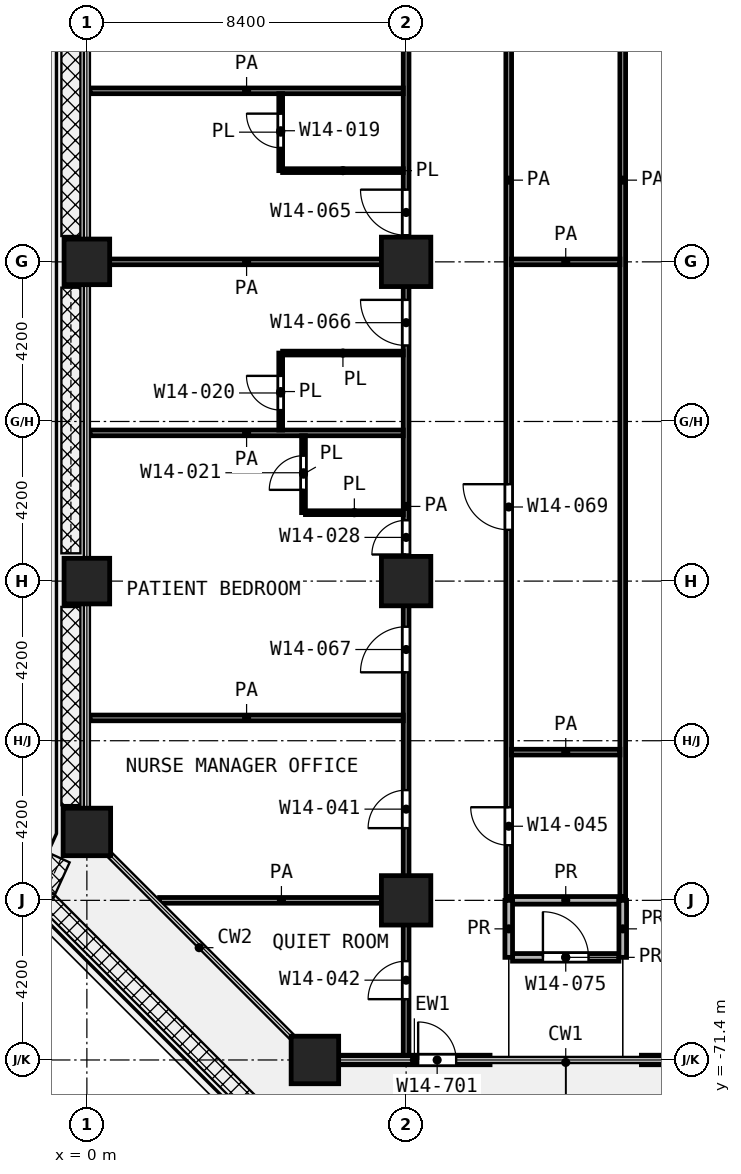
"""IFC4 building model, lengths in metres.
Left out: names, types, materials, properties, quantities, classifications, styles, units other than length and angle.
Written with IfcOpenShell. Run it as: python <this file> out.ifc"""

import sys

from ifc_helpers import new_model, si_unit, direction, frame, frame_2d, origin, origin_2d, place, context, subcontext, project, spatial, rectangle, extrude, element, fill, save


model = new_model("IFC4")
c1 = context("Model", 3, precision=1e-05, world=origin(), true_north=direction((0.0, 1.0)))
c2 = subcontext(c1, "Body", "Model", "MODEL_VIEW")
j1 = project(units=[si_unit("LENGTHUNIT", "METRE"), si_unit("PLANEANGLEUNIT", "RADIAN")], contexts=[c1])
p1 = place(None, origin())
s1 = spatial("IfcSite", under=j1, at=p1, CompositionType="ELEMENT")
p2 = place(p1, origin())
s2 = spatial("IfcBuilding", under=s1, at=p2, CompositionType="ELEMENT")
p3 = place(p2, frame((0.0, 0.0, 64.4)))
s3 = spatial("IfcBuildingStorey", under=s2, at=p3, CompositionType="ELEMENT", Elevation=64.4)
p4 = place(p3, frame((0.0, -50.4, 0.0), z_axis=(0.0, 0.0, 1.0), x_axis=(1.0, 0.0, 0.0)))
e1 = element("IfcColumn", 1, at=p4, inside=s3, PredefinedType="COLUMN", context=c2, shape_type="SweptSolid", body=[
    extrude(rectangle(XDim=1.2, YDim=1.2, at=origin_2d()), origin(), (0.0, 0.0, 1.0), 4.2),
])
p5 = place(p3, frame((8.4, -50.4, 0.0), z_axis=(0.0, 0.0, 1.0), x_axis=(1.0, 0.0, 0.0)))
e2 = element("IfcColumn", 2, at=p5, inside=s3, PredefinedType="COLUMN", context=c2, shape_type="SweptSolid", body=[
    extrude(rectangle(XDim=1.3, YDim=1.3, at=origin_2d()), origin(), (0.0, 0.0, 1.0), 4.2),
])
p6 = place(p3, frame((0.0, -58.8, 0.0), z_axis=(0.0, 0.0, 1.0), x_axis=(1.0, 0.0, 0.0)))
e3 = element("IfcColumn", 3, at=p6, inside=s3, PredefinedType="COLUMN", context=c2, shape_type="SweptSolid", body=[
    extrude(rectangle(XDim=1.2, YDim=1.2, at=origin_2d()), origin(), (0.0, 0.0, 1.0), 4.2),
])
p7 = place(p3, frame((8.4, -58.8, 0.0), z_axis=(0.0, 0.0, 1.0), x_axis=(1.0, 0.0, 0.0)))
e4 = element("IfcColumn", 4, at=p7, inside=s3, PredefinedType="COLUMN", context=c2, shape_type="SweptSolid", body=[
    extrude(rectangle(XDim=1.3, YDim=1.3, at=origin_2d()), origin(), (0.0, 0.0, 1.0), 4.2),
])
p8 = place(p3, frame((0.0, -65.4, 0.0), z_axis=(0.0, 0.0, 1.0), x_axis=(1.0, 0.0, 0.0)))
e5 = element("IfcColumn", 5, at=p8, inside=s3, PredefinedType="COLUMN", context=c2, shape_type="SweptSolid", body=[
    extrude(rectangle(XDim=1.25, YDim=1.25, at=origin_2d()), origin(), (0.0, 0.0, 1.0), 4.2),
])
p9 = place(p3, frame((8.4, -67.2, 0.0), z_axis=(0.0, 0.0, 1.0), x_axis=(1.0, 0.0, 0.0)))
e6 = element("IfcColumn", 6, at=p9, inside=s3, PredefinedType="COLUMN", context=c2, shape_type="SweptSolid", body=[
    extrude(rectangle(XDim=1.3, YDim=1.3, at=origin_2d()), origin(), (0.0, 0.0, 1.0), 4.2),
])
p10 = place(p3, frame((6.0, -71.4, 0.0), z_axis=(0.0, 0.0, 1.0), x_axis=(1.0, 0.0, 0.0)))
e7 = element("IfcColumn", 7, at=p10, inside=s3, PredefinedType="COLUMN", context=c2, shape_type="SweptSolid", body=[
    extrude(rectangle(XDim=1.25, YDim=1.25, at=origin_2d()), origin(), (0.0, 0.0, 1.0), 4.2),
])
p11 = place(p3, frame((6.625, -71.4, 0.0), z_axis=(0.0, 0.0, 1.0), x_axis=(1.0, 0.0, 0.0)))
e8 = element("IfcWall", 8, at=p11, inside=s3, PredefinedType="SOLIDWALL", context=c2, shape_type="SweptSolid", body=[
    extrude(rectangle(XDim=3.983, YDim=0.25, at=frame_2d((1.992, 0.0))), origin(), (0.0, 0.0, 1.0), 3.78),
])
p12 = place(p11, frame((2.092, 0.0, 0.0)))
e9 = element("IfcOpeningElement", 9, at=p12, cuts=e8, PredefinedType="OPENING", context=c2, shape_type="SweptSolid", body=[
    extrude(rectangle(XDim=1.0, YDim=2.1, at=frame_2d((0.5, 1.05))), frame((0.0, 0.135, 0.0), z_axis=(0.0, -1.0, 0.0), x_axis=(1.0, 0.0, 0.0)), (0.0, 0.0, 1.0), 0.27),
])
p13 = place(p3, frame((14.592, -71.4, 0.0), z_axis=(0.0, 0.0, 1.0), x_axis=(1.0, 0.0, 0.0)))
e10 = element("IfcWall", 10, at=p13, inside=s3, PredefinedType="SOLIDWALL", context=c2, shape_type="SweptSolid", body=[
    extrude(rectangle(XDim=3.983, YDim=0.25, at=frame_2d((1.992, 0.0))), origin(), (0.0, 0.0, 1.0), 3.78),
])
p14 = place(p13, frame((0.892, 0.0, 0.0)))
e11 = element("IfcOpeningElement", 11, at=p14, cuts=e10, PredefinedType="OPENING", context=c2, shape_type="SweptSolid", body=[
    extrude(rectangle(XDim=1.0, YDim=2.1, at=frame_2d((0.5, 1.05))), frame((0.0, 0.135, 0.0), z_axis=(0.0, -1.0, 0.0), x_axis=(1.0, 0.0, 0.0)), (0.0, 0.0, 1.0), 0.27),
])
p15 = place(p3, frame((5.751, -57.0, 0.0), z_axis=(0.0, 0.0, 1.0), x_axis=(1.0, 0.0, 0.0)))
e12 = element("IfcWall", 12, at=p15, inside=s3, PredefinedType="PARTITIONING", context=c2, shape_type="SweptSolid", body=[
    extrude(rectangle(XDim=2.574, YDim=0.1, at=frame_2d((1.287, 0.0))), origin(), (0.0, 0.0, 1.0), 3.9),
])
for number, where, z_axis, x_axis in (
    (13, (5.15, -52.8, 0.0), (0.0, 0.0, 1.0), (1.0, 0.0, 0.0)),
    (14, (5.15, -48.0, 0.0), (0.0, 0.0, 1.0), (1.0, 0.0, 0.0)),
):
    element("IfcWall", number, at=place(p3, frame(where, z_axis=z_axis, x_axis=x_axis)), inside=s3, PredefinedType="PARTITIONING", context=c2, shape_type="SweptSolid", body=[
        extrude(rectangle(XDim=3.175, YDim=0.1, at=frame_2d((1.587, 0.0))), origin(), (0.0, 0.0, 1.0), 3.9),
    ])
p16 = place(p3, frame((5.1, -54.825, 0.0), z_axis=(0.0, 0.0, 1.0), x_axis=(0.0, 1.0, 0.0)))
e15 = element("IfcWall", 15, at=p16, inside=s3, PredefinedType="PARTITIONING", context=c2, shape_type="SweptSolid", body=[
    extrude(rectangle(XDim=2.025, YDim=0.1, at=frame_2d((1.012, 0.0))), origin(), (0.0, 0.0, 1.0), 3.9),
])
p17 = place(p16, frame((0.525, 0.0, 0.0)))
e16 = element("IfcOpeningElement", 16, at=p17, cuts=e15, PredefinedType="OPENING", context=c2, shape_type="SweptSolid", body=[
    extrude(rectangle(XDim=0.9, YDim=2.1, at=frame_2d((0.45, 1.05))), frame((0.0, 0.06, 0.0), z_axis=(0.0, -1.0, 0.0), x_axis=(1.0, 0.0, 0.0)), (0.0, 0.0, 1.0), 0.12),
])
p18 = place(p3, frame((5.1, -48.0, 0.0), z_axis=(0.0, 0.0, 1.0), x_axis=(0.0, 1.0, 0.0)))
e17 = element("IfcWall", 17, at=p18, inside=s3, PredefinedType="PARTITIONING", context=c2, shape_type="SweptSolid", body=[
    extrude(rectangle(XDim=2.025, YDim=0.1, at=frame_2d((1.012, 0.0))), origin(), (0.0, 0.0, 1.0), 3.9),
])
p19 = place(p18, frame((0.6, 0.0, 0.0)))
e18 = element("IfcOpeningElement", 18, at=p19, cuts=e17, PredefinedType="OPENING", context=c2, shape_type="SweptSolid", body=[
    extrude(rectangle(XDim=0.9, YDim=2.1, at=frame_2d((0.45, 1.05))), frame((0.0, 0.06, 0.0), z_axis=(0.0, -1.0, 0.0), x_axis=(1.0, 0.0, 0.0)), (0.0, 0.0, 1.0), 0.12),
])
p20 = place(p3, frame((5.7, -56.998, 0.0), z_axis=(0.0, 0.0, 1.0), x_axis=(0.0, 1.0, 0.0)))
e19 = element("IfcWall", 19, at=p20, inside=s3, PredefinedType="PARTITIONING", context=c2, shape_type="SweptSolid", body=[
    extrude(rectangle(XDim=2.023, YDim=0.1, at=frame_2d((1.011, 0.0))), origin(), (0.0, 0.0, 1.0), 3.9),
])
p21 = place(p20, frame((0.599, 0.0, 0.0)))
e20 = element("IfcOpeningElement", 20, at=p21, cuts=e19, PredefinedType="OPENING", context=c2, shape_type="SweptSolid", body=[
    extrude(rectangle(XDim=0.9, YDim=2.1, at=frame_2d((0.45, 1.05))), frame((0.0, 0.06, 0.0), z_axis=(0.0, -1.0, 0.0), x_axis=(1.0, 0.0, 0.0)), (0.0, 0.0, 1.0), 0.12),
])
p22 = place(p3, frame((1.913, -67.2, 0.0), z_axis=(0.0, 0.0, 1.0), x_axis=(1.0, 0.0, 0.0)))
e21 = element("IfcWall", 21, at=p22, inside=s3, PredefinedType="PARTITIONING", context=c2, shape_type="SweptSolid", body=[
    extrude(rectangle(XDim=6.412, YDim=0.15, at=frame_2d((3.206, 0.0))), origin(), (0.0, 0.0, 1.0), 3.9),
])
p23 = place(p3, frame((11.175, -63.3, 0.0), z_axis=(0.0, 0.0, 1.0), x_axis=(1.0, 0.0, 0.0)))
e22 = element("IfcWall", 22, at=p23, inside=s3, PredefinedType="PARTITIONING", context=c2, shape_type="SweptSolid", body=[
    extrude(rectangle(XDim=2.85, YDim=0.15, at=frame_2d((1.425, 0.0))), origin(), (0.0, 0.0, 1.0), 3.9),
])
for number, where, z_axis, x_axis in (
    (23, (0.08, -62.4, 0.0), (0.0, 0.0, 1.0), (1.0, 0.0, 0.0)),
    (24, (0.08, -54.9, 0.0), (0.0, 0.0, 1.0), (1.0, 0.0, 0.0)),
    (25, (0.08, -50.4, 0.0), (0.0, 0.0, 1.0), (1.0, 0.0, 0.0)),
):
    element("IfcWall", number, at=place(p3, frame(where, z_axis=z_axis, x_axis=x_axis)), inside=s3, PredefinedType="PARTITIONING", context=c2, shape_type="SweptSolid", body=[
        extrude(rectangle(XDim=8.245, YDim=0.15, at=frame_2d((4.123, 0.0))), origin(), (0.0, 0.0, 1.0), 3.9),
    ])
p24 = place(p3, frame((11.175, -50.4, 0.0), z_axis=(0.0, 0.0, 1.0), x_axis=(1.0, 0.0, 0.0)))
e26 = element("IfcWall", 26, at=p24, inside=s3, PredefinedType="PARTITIONING", context=c2, shape_type="SweptSolid", body=[
    extrude(rectangle(XDim=2.85, YDim=0.15, at=frame_2d((1.425, 0.0))), origin(), (0.0, 0.0, 1.0), 3.9),
])
p25 = place(p3, frame((0.08, -45.9, 0.0), z_axis=(0.0, 0.0, 1.0), x_axis=(1.0, 0.0, 0.0)))
e27 = element("IfcWall", 27, at=p25, inside=s3, PredefinedType="PARTITIONING", context=c2, shape_type="SweptSolid", body=[
    extrude(rectangle(XDim=8.245, YDim=0.15, at=frame_2d((4.123, 0.0))), origin(), (0.0, 0.0, 1.0), 3.9),
])
p26 = place(p3, frame((8.4, -71.32, 0.0), z_axis=(0.0, 0.0, 1.0), x_axis=(0.0, 1.0, 0.0)))
e28 = element("IfcWall", 28, at=p26, inside=s3, PredefinedType="PARTITIONING", context=c2, shape_type="SweptSolid", body=[
    extrude(rectangle(XDim=28.97, YDim=0.15, at=frame_2d((14.485, 0.0))), origin(), (0.0, 0.0, 1.0), 3.9),
])
p27 = place(p26, frame((21.62, 0.0, 0.0)))
e29 = element("IfcOpeningElement", 29, at=p27, cuts=e28, PredefinedType="OPENING", context=c2, shape_type="SweptSolid", body=[
    extrude(rectangle(XDim=1.2, YDim=2.1, at=frame_2d((0.6, 1.05))), frame((0.0, 0.085, 0.0), z_axis=(0.0, -1.0, 0.0), x_axis=(1.0, 0.0, 0.0)), (0.0, 0.0, 1.0), 0.17),
])
p28 = place(p26, frame((18.72, 0.0, 0.0)))
e30 = element("IfcOpeningElement", 30, at=p28, cuts=e28, PredefinedType="OPENING", context=c2, shape_type="SweptSolid", body=[
    extrude(rectangle(XDim=1.2, YDim=2.1, at=frame_2d((0.6, 1.05))), frame((0.0, 0.085, 0.0), z_axis=(0.0, -1.0, 0.0), x_axis=(1.0, 0.0, 0.0)), (0.0, 0.0, 1.0), 0.17),
])
p29 = place(p26, frame((10.12, 0.0, 0.0)))
e31 = element("IfcOpeningElement", 31, at=p29, cuts=e28, PredefinedType="OPENING", context=c2, shape_type="SweptSolid", body=[
    extrude(rectangle(XDim=1.2, YDim=2.1, at=frame_2d((0.6, 1.05))), frame((0.0, 0.085, 0.0), z_axis=(0.0, -1.0, 0.0), x_axis=(1.0, 0.0, 0.0)), (0.0, 0.0, 1.0), 0.17),
])
p30 = place(p26, frame((13.22, 0.0, 0.0)))
e32 = element("IfcOpeningElement", 32, at=p30, cuts=e28, PredefinedType="OPENING", context=c2, shape_type="SweptSolid", body=[
    extrude(rectangle(XDim=0.9, YDim=2.1, at=frame_2d((0.45, 1.05))), frame((0.0, 0.085, 0.0), z_axis=(0.0, -1.0, 0.0), x_axis=(1.0, 0.0, 0.0)), (0.0, 0.0, 1.0), 0.17),
])
p31 = place(p26, frame((6.02, 0.0, 0.0)))
e33 = element("IfcOpeningElement", 33, at=p31, cuts=e28, PredefinedType="OPENING", context=c2, shape_type="SweptSolid", body=[
    extrude(rectangle(XDim=1.0, YDim=2.1, at=frame_2d((0.5, 1.05))), frame((0.0, 0.085, 0.0), z_axis=(0.0, -1.0, 0.0), x_axis=(1.0, 0.0, 0.0)), (0.0, 0.0, 1.0), 0.17),
])
p32 = place(p26, frame((1.52, 0.0, 0.0)))
e34 = element("IfcOpeningElement", 34, at=p32, cuts=e28, PredefinedType="OPENING", context=c2, shape_type="SweptSolid", body=[
    extrude(rectangle(XDim=1.0, YDim=2.1, at=frame_2d((0.5, 1.05))), frame((0.0, 0.085, 0.0), z_axis=(0.0, -1.0, 0.0), x_axis=(1.0, 0.0, 0.0)), (0.0, 0.0, 1.0), 0.17),
])
p33 = place(p3, frame((11.1, -67.1, 0.0), z_axis=(0.0, 0.0, 1.0), x_axis=(0.0, 1.0, 0.0)))
e35 = element("IfcWall", 35, at=p33, inside=s3, PredefinedType="PARTITIONING", context=c2, shape_type="SweptSolid", body=[
    extrude(rectangle(XDim=37.7, YDim=0.15, at=frame_2d((18.85, 0.0))), origin(), (0.0, 0.0, 1.0), 3.9),
])
p34 = place(p33, frame((35.1, 0.0, 0.0)))
e36 = element("IfcOpeningElement", 36, at=p34, cuts=e35, PredefinedType="OPENING", context=c2, shape_type="SweptSolid", body=[
    extrude(rectangle(XDim=1.0, YDim=2.1, at=frame_2d((0.5, 1.05))), frame((0.0, 0.085, 0.0), z_axis=(0.0, -1.0, 0.0), x_axis=(1.0, 0.0, 0.0)), (0.0, 0.0, 1.0), 0.17),
])
p35 = place(p33, frame((22.4, 0.0, 0.0)))
e37 = element("IfcOpeningElement", 37, at=p35, cuts=e35, PredefinedType="OPENING", context=c2, shape_type="SweptSolid", body=[
    extrude(rectangle(XDim=1.2, YDim=2.1, at=frame_2d((0.6, 1.05))), frame((0.0, 0.085, 0.0), z_axis=(0.0, -1.0, 0.0), x_axis=(1.0, 0.0, 0.0)), (0.0, 0.0, 1.0), 0.17),
])
p36 = place(p33, frame((9.65, 0.0, 0.0)))
e38 = element("IfcOpeningElement", 38, at=p36, cuts=e35, PredefinedType="OPENING", context=c2, shape_type="SweptSolid", body=[
    extrude(rectangle(XDim=1.2, YDim=2.1, at=frame_2d((0.6, 1.05))), frame((0.0, 0.085, 0.0), z_axis=(0.0, -1.0, 0.0), x_axis=(1.0, 0.0, 0.0)), (0.0, 0.0, 1.0), 0.17),
])
p37 = place(p33, frame((1.35, 0.0, 0.0)))
e39 = element("IfcOpeningElement", 39, at=p37, cuts=e35, PredefinedType="OPENING", context=c2, shape_type="SweptSolid", body=[
    extrude(rectangle(XDim=1.0, YDim=2.1, at=frame_2d((0.5, 1.05))), frame((0.0, 0.085, 0.0), z_axis=(0.0, -1.0, 0.0), x_axis=(1.0, 0.0, 0.0)), (0.0, 0.0, 1.0), 0.17),
])
p38 = place(p3, frame((14.1, -67.1, 0.0), z_axis=(0.0, 0.0, 1.0), x_axis=(0.0, 1.0, 0.0)))
e40 = element("IfcWall", 40, at=p38, inside=s3, PredefinedType="PARTITIONING", context=c2, shape_type="SweptSolid", body=[
    extrude(rectangle(XDim=37.7, YDim=0.15, at=frame_2d((18.85, 0.0))), origin(), (0.0, 0.0, 1.0), 3.9),
])
p39 = place(p38, frame((30.9, 0.0, 0.0)))
e41 = element("IfcOpeningElement", 41, at=p39, cuts=e40, PredefinedType="OPENING", context=c2, shape_type="SweptSolid", body=[
    extrude(rectangle(XDim=1.0, YDim=2.1, at=frame_2d((0.5, 1.05))), frame((0.0, 0.085, 0.0), z_axis=(0.0, -1.0, 0.0), x_axis=(1.0, 0.0, 0.0)), (0.0, 0.0, 1.0), 0.17),
])
p40 = place(p3, frame((11.2, -68.7, 0.0), z_axis=(0.0, 0.0, 1.0), x_axis=(1.0, 0.0, 0.0)))
e42 = element("IfcWall", 42, at=p40, inside=s3, PredefinedType="PARTITIONING", context=c2, shape_type="SweptSolid", body=[
    extrude(rectangle(XDim=2.8, YDim=0.2, at=frame_2d((1.4, 0.0))), origin(), (0.0, 0.0, 1.0), 3.9),
])
p41 = place(p40, frame((0.8, 0.0, 0.0)))
e43 = element("IfcOpeningElement", 43, at=p41, cuts=e42, PredefinedType="OPENING", context=c2, shape_type="SweptSolid", body=[
    extrude(rectangle(XDim=1.2, YDim=2.1, at=frame_2d((0.6, 1.05))), frame((0.0, 0.11, 0.0), z_axis=(0.0, -1.0, 0.0), x_axis=(1.0, 0.0, 0.0)), (0.0, 0.0, 1.0), 0.22),
])
p42 = place(p3, frame((11.2, -67.2, 0.0), z_axis=(0.0, 0.0, 1.0), x_axis=(1.0, 0.0, 0.0)))
e44 = element("IfcWall", 44, at=p42, inside=s3, PredefinedType="PARTITIONING", context=c2, shape_type="SweptSolid", body=[
    extrude(rectangle(XDim=2.8, YDim=0.2, at=frame_2d((1.4, 0.0))), origin(), (0.0, 0.0, 1.0), 3.9),
])
for number, where, z_axis, x_axis in (
    (45, (11.1, -68.7, 0.0), (0.0, 0.0, 1.0), (0.0, 1.0, 0.0)),
    (46, (14.1, -68.7, 0.0), (0.0, 0.0, 1.0), (0.0, 1.0, 0.0)),
):
    element("IfcWall", number, at=place(p3, frame(where, z_axis=z_axis, x_axis=x_axis)), inside=s3, PredefinedType="PARTITIONING", context=c2, shape_type="SweptSolid", body=[
        extrude(rectangle(XDim=1.5, YDim=0.2, at=frame_2d((0.75, 0.0))), origin(), (0.0, 0.0, 1.0), 3.9),
    ])
p43 = place(p12, origin())
e47 = element("IfcDoor", 47, at=p43, inside=s3, OperationType="SINGLE_SWING_LEFT", PredefinedType="DOOR", context=c2, shape_type="SweptSolid", body=[
    extrude(rectangle(XDim=1.0, YDim=2.1, at=frame_2d((0.5, 1.05))), frame((0.0, 0.025, 0.0), z_axis=(0.0, -1.0, 0.0), x_axis=(1.0, 0.0, 0.0)), (0.0, 0.0, 1.0), 0.05),
])
fill(e9, e47)
p44 = place(p27, origin())
e48 = element("IfcDoor", 48, at=p44, inside=s3, OperationType="SINGLE_SWING_RIGHT", PredefinedType="DOOR", context=c2, shape_type="SweptSolid", body=[
    extrude(rectangle(XDim=1.2, YDim=2.1, at=frame_2d((0.6, 1.05))), frame((0.0, 0.025, 0.0), z_axis=(0.0, -1.0, 0.0), x_axis=(1.0, 0.0, 0.0)), (0.0, 0.0, 1.0), 0.05),
])
fill(e29, e48)
p45 = place(p19, origin())
e49 = element("IfcDoor", 49, at=p45, inside=s3, OperationType="SINGLE_SWING_RIGHT", PredefinedType="DOOR", context=c2, shape_type="SweptSolid", body=[
    extrude(rectangle(XDim=0.9, YDim=2.1, at=frame_2d((0.45, 1.05))), frame((0.0, 0.025, 0.0), z_axis=(0.0, -1.0, 0.0), x_axis=(1.0, 0.0, 0.0)), (0.0, 0.0, 1.0), 0.05),
])
fill(e18, e49)
p46 = place(p28, origin())
e50 = element("IfcDoor", 50, at=p46, inside=s3, OperationType="SINGLE_SWING_RIGHT", PredefinedType="DOOR", context=c2, shape_type="SweptSolid", body=[
    extrude(rectangle(XDim=1.2, YDim=2.1, at=frame_2d((0.6, 1.05))), frame((0.0, 0.025, 0.0), z_axis=(0.0, -1.0, 0.0), x_axis=(1.0, 0.0, 0.0)), (0.0, 0.0, 1.0), 0.05),
])
fill(e30, e50)
p47 = place(p17, origin())
e51 = element("IfcDoor", 51, at=p47, inside=s3, OperationType="SINGLE_SWING_RIGHT", PredefinedType="DOOR", context=c2, shape_type="SweptSolid", body=[
    extrude(rectangle(XDim=0.9, YDim=2.1, at=frame_2d((0.45, 1.05))), frame((0.0, 0.025, 0.0), z_axis=(0.0, -1.0, 0.0), x_axis=(1.0, 0.0, 0.0)), (0.0, 0.0, 1.0), 0.05),
])
fill(e16, e51)
p48 = place(p29, origin())
e52 = element("IfcDoor", 52, at=p48, inside=s3, OperationType="SINGLE_SWING_LEFT", PredefinedType="DOOR", context=c2, shape_type="SweptSolid", body=[
    extrude(rectangle(XDim=1.2, YDim=2.1, at=frame_2d((0.6, 1.05))), frame((0.0, 0.025, 0.0), z_axis=(0.0, -1.0, 0.0), x_axis=(1.0, 0.0, 0.0)), (0.0, 0.0, 1.0), 0.05),
])
fill(e31, e52)
p49 = place(p30, origin())
e53 = element("IfcDoor", 53, at=p49, inside=s3, OperationType="SINGLE_SWING_LEFT", PredefinedType="DOOR", context=c2, shape_type="SweptSolid", body=[
    extrude(rectangle(XDim=0.9, YDim=2.1, at=frame_2d((0.45, 1.05))), frame((0.0, 0.025, 0.0), z_axis=(0.0, -1.0, 0.0), x_axis=(1.0, 0.0, 0.0)), (0.0, 0.0, 1.0), 0.05),
])
fill(e32, e53)
p50 = place(p21, origin())
e54 = element("IfcDoor", 54, at=p50, inside=s3, OperationType="SINGLE_SWING_LEFT", PredefinedType="DOOR", context=c2, shape_type="SweptSolid", body=[
    extrude(rectangle(XDim=0.9, YDim=2.1, at=frame_2d((0.45, 1.05))), frame((0.0, 0.025, 0.0), z_axis=(0.0, -1.0, 0.0), x_axis=(1.0, 0.0, 0.0)), (0.0, 0.0, 1.0), 0.05),
])
fill(e20, e54)
p51 = place(p31, origin())
e55 = element("IfcDoor", 55, at=p51, inside=s3, OperationType="SINGLE_SWING_LEFT", PredefinedType="DOOR", context=c2, shape_type="SweptSolid", body=[
    extrude(rectangle(XDim=1.0, YDim=2.1, at=frame_2d((0.5, 1.05))), frame((0.0, 0.025, 0.0), z_axis=(0.0, -1.0, 0.0), x_axis=(1.0, 0.0, 0.0)), (0.0, 0.0, 1.0), 0.05),
])
fill(e33, e55)
p52 = place(p32, origin())
e56 = element("IfcDoor", 56, at=p52, inside=s3, OperationType="SINGLE_SWING_LEFT", PredefinedType="DOOR", context=c2, shape_type="SweptSolid", body=[
    extrude(rectangle(XDim=1.0, YDim=2.1, at=frame_2d((0.5, 1.05))), frame((0.0, 0.025, 0.0), z_axis=(0.0, -1.0, 0.0), x_axis=(1.0, 0.0, 0.0)), (0.0, 0.0, 1.0), 0.05),
])
fill(e34, e56)
p53 = place(p36, origin())
e57 = element("IfcDoor", 57, at=p53, inside=s3, OperationType="SINGLE_SWING_RIGHT", PredefinedType="DOOR", context=c2, shape_type="SweptSolid", body=[
    extrude(rectangle(XDim=1.2, YDim=2.1, at=frame_2d((0.6, 1.05))), frame((0.0, 0.025, 0.0), z_axis=(0.0, -1.0, 0.0), x_axis=(1.0, 0.0, 0.0)), (0.0, 0.0, 1.0), 0.05),
])
fill(e38, e57)
p54 = place(p37, origin())
e58 = element("IfcDoor", 58, at=p54, inside=s3, OperationType="SINGLE_SWING_RIGHT", PredefinedType="DOOR", context=c2, shape_type="SweptSolid", body=[
    extrude(rectangle(XDim=1.0, YDim=2.1, at=frame_2d((0.5, 1.05))), frame((0.0, 0.025, 0.0), z_axis=(0.0, -1.0, 0.0), x_axis=(1.0, 0.0, 0.0)), (0.0, 0.0, 1.0), 0.05),
])
fill(e39, e58)
p55 = place(p41, origin())
e59 = element("IfcDoor", 59, at=p55, inside=s3, OperationType="SINGLE_SWING_LEFT", PredefinedType="DOOR", context=c2, shape_type="SweptSolid", body=[
    extrude(rectangle(XDim=1.2, YDim=2.1, at=frame_2d((0.6, 1.05))), frame((0.0, 0.025, 0.0), z_axis=(0.0, -1.0, 0.0), x_axis=(1.0, 0.0, 0.0)), (0.0, 0.0, 1.0), 0.05),
])
fill(e43, e59)
save(model, sys.argv[1])
